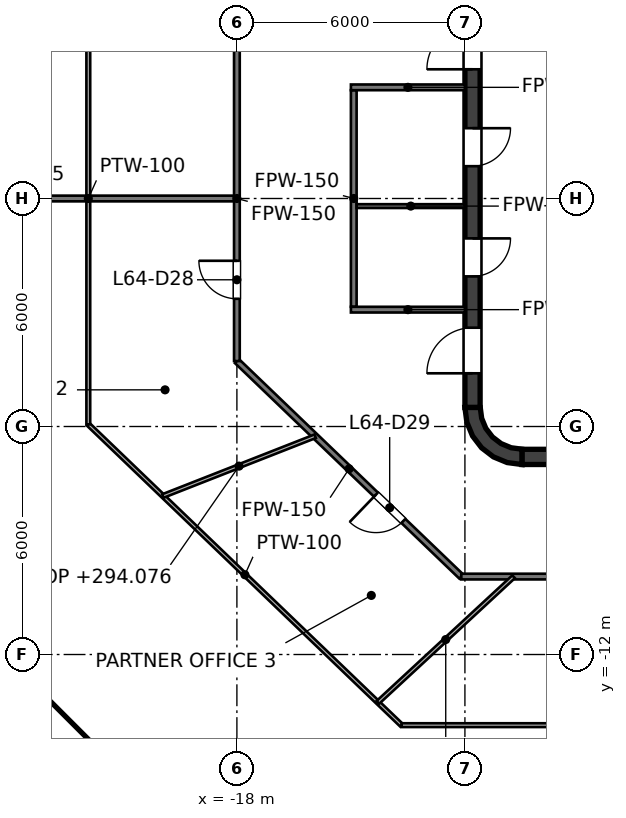
"""IFC4 building model, lengths in metres.
Left out: names, types, materials, properties, quantities, classifications, styles, units other than length and angle.
Written with IfcOpenShell. Run it as: python <this file> out.ifc"""

import sys

from ifc_helpers import new_model, si_unit, direction, frame, frame_2d, origin, place, context, subcontext, project, spatial, polyline, rectangle, outline, extrude, element, fill, save


model = new_model("IFC4")
c1 = context("Model", 3, precision=1e-05, world=origin(), true_north=direction((0.0, 1.0)))
c2 = subcontext(c1, "Body", "Model", "MODEL_VIEW")
j1 = project(units=[si_unit("LENGTHUNIT", "METRE"), si_unit("PLANEANGLEUNIT", "RADIAN")], contexts=[c1])
p1 = place(None, origin())
s1 = spatial("IfcSite", under=j1, at=p1, CompositionType="ELEMENT")
p2 = place(p1, origin())
s2 = spatial("IfcBuilding", under=s1, at=p2, CompositionType="ELEMENT")
p3 = place(p2, frame((0.0, 0.0, 291.0)))
s3 = spatial("IfcBuildingStorey", under=s2, at=p3, CompositionType="ELEMENT", Elevation=291.0)
p4 = place(p3, frame((-10.5, -6.8, 0.0), z_axis=(0.0, 0.0, 1.0), x_axis=(1.0, 0.0, 0.0)))
e1 = element("IfcWall", 1, at=p4, inside=s3, PredefinedType="SHEAR", context=c2, shape_type="SweptSolid", body=[
    extrude(rectangle(XDim=21.0, YDim=0.4, at=frame_2d((10.5, 0.0))), origin(), (0.0, 0.0, 1.0), 4.0),
])
p5 = place(p3, frame((-11.8, -5.5, 0.0), z_axis=(0.0, 0.0, 1.0), x_axis=(0.0, 1.0, 0.0)))
e2 = element("IfcWall", 2, at=p5, inside=s3, PredefinedType="SHEAR", context=c2, shape_type="SweptSolid", body=[
    extrude(rectangle(XDim=11.0, YDim=0.4, at=frame_2d((5.5, 0.0))), origin(), (0.0, 0.0, 1.0), 4.0),
])
p6 = place(p5, frame((3.45, 0.0, 0.0)))
e3 = element("IfcOpeningElement", 3, at=p6, cuts=e2, PredefinedType="OPENING", context=c2, shape_type="SweptSolid", body=[
    extrude(rectangle(XDim=1.0, YDim=2.1, at=frame_2d((0.5, 1.05))), frame((0.0, 0.2, 0.0), z_axis=(0.0, -1.0, 0.0), x_axis=(1.0, 0.0, 0.0)), (0.0, 0.0, 1.0), 0.4),
])
p7 = place(p5, frame((6.35, 0.0, 0.0)))
e4 = element("IfcOpeningElement", 4, at=p7, cuts=e2, PredefinedType="OPENING", context=c2, shape_type="SweptSolid", body=[
    extrude(rectangle(XDim=1.0, YDim=2.1, at=frame_2d((0.5, 1.05))), frame((0.0, 0.2, 0.0), z_axis=(0.0, -1.0, 0.0), x_axis=(1.0, 0.0, 0.0)), (0.0, 0.0, 1.0), 0.4),
])
p8 = place(p5, frame((0.9, 0.0, 0.0)))
e5 = element("IfcOpeningElement", 5, at=p8, cuts=e2, PredefinedType="OPENING", context=c2, shape_type="SweptSolid", body=[
    extrude(rectangle(XDim=1.2, YDim=2.1, at=frame_2d((0.6, 1.05))), frame((0.0, 0.2, 0.0), z_axis=(0.0, -1.0, 0.0), x_axis=(1.0, 0.0, 0.0)), (0.0, 0.0, 1.0), 0.4),
])
p9 = place(p5, frame((8.9, 0.0, 0.0)))
e6 = element("IfcOpeningElement", 6, at=p9, cuts=e2, PredefinedType="OPENING", context=c2, shape_type="SweptSolid", body=[
    extrude(rectangle(XDim=1.2, YDim=2.1, at=frame_2d((0.6, 1.05))), frame((0.0, 0.2, 0.0), z_axis=(0.0, -1.0, 0.0), x_axis=(1.0, 0.0, 0.0)), (0.0, 0.0, 1.0), 0.4),
])
p10 = place(p3, origin())
e7 = element("IfcWall", 7, at=p10, inside=s3, PredefinedType="SHEAR", context=c2, shape_type="SweptSolid", body=[
    extrude(outline(polyline([(-10.5, -7.0), (-10.5, -6.596), (-10.784, -6.559), (-11.048, -6.45), (-11.275, -6.275), (-11.45, -6.048), (-11.559, -5.784), (-11.596, -5.5), (-12.0, -5.5), (-11.949, -5.888), (-11.799, -6.25), (-11.561, -6.561), (-11.25, -6.799), (-10.888, -6.949), (-10.5, -7.0)])), origin(), (0.0, 0.0, 1.0), 4.0),
])
p11 = place(p3, frame((-14.925, -2.85, 0.0), z_axis=(0.0, 0.0, 1.0), x_axis=(0.0, 1.0, 0.0)))
e8 = element("IfcWall", 8, at=p11, inside=s3, PredefinedType="PARTITIONING", context=c2, shape_type="SweptSolid", body=[
    extrude(rectangle(XDim=5.7, YDim=0.15, at=frame_2d((2.85, 0.0))), origin(), (0.0, 0.0, 1.0), 2.927),
])
for number, where, z_axis, x_axis in (
    (9, (-15.0, 2.925, 0.0), (0.0, 0.0, 1.0), (1.0, 0.0, 0.0)),
    (10, (-15.0, -2.925, 0.0), (0.0, 0.0, 1.0), (1.0, 0.0, 0.0)),
):
    element("IfcWall", number, at=place(p3, frame(where, z_axis=z_axis, x_axis=x_axis)), inside=s3, PredefinedType="PARTITIONING", context=c2, shape_type="SweptSolid", body=[
        extrude(rectangle(XDim=3.0, YDim=0.15, at=frame_2d((1.5, 0.0))), origin(), (0.0, 0.0, 1.0), 3.85),
    ])
p12 = place(p3, frame((-14.85, -0.2, 0.0), z_axis=(0.0, 0.0, 1.0), x_axis=(1.0, 0.0, 0.0)))
e11 = element("IfcWall", 11, at=p12, inside=s3, PredefinedType="PARTITIONING", context=c2, shape_type="SweptSolid", body=[
    extrude(rectangle(XDim=2.85, YDim=0.1, at=frame_2d((1.425, 0.0))), origin(), (0.0, 0.0, 1.0), 3.85),
])
p13 = place(p3, frame((-18.0, -4.278, 0.0), z_axis=(0.0, 0.0, 1.0), x_axis=(0.721290181137, -0.692633001376, 0.0)))
e12 = element("IfcWall", 12, at=p13, inside=s3, PredefinedType="PARTITIONING", context=c2, shape_type="SweptSolid", body=[
    extrude(rectangle(XDim=8.187, YDim=0.15, at=frame_2d((4.094, 0.0))), origin(), (0.0, 0.0, 1.0), 2.927),
])
p14 = place(p13, frame((5.074, 0.0, 0.0)))
e13 = element("IfcOpeningElement", 13, at=p14, cuts=e12, PredefinedType="OPENING", context=c2, shape_type="SweptSolid", body=[
    extrude(rectangle(XDim=1.0, YDim=2.1, at=frame_2d((0.5, 1.05))), frame((0.0, 0.075, 0.0), z_axis=(0.0, -1.0, 0.0), x_axis=(1.0, 0.0, 0.0)), (0.0, 0.0, 1.0), 0.15),
])
p15 = place(p3, frame((-12.095, -9.949, 0.0), z_axis=(0.0, 0.0, 1.0), x_axis=(1.0, 0.0, 0.0)))
e14 = element("IfcWall", 14, at=p15, inside=s3, PredefinedType="PARTITIONING", context=c2, shape_type="SweptSolid", body=[
    extrude(rectangle(XDim=24.19, YDim=0.15, at=frame_2d((12.095, 0.0))), origin(), (0.0, 0.0, 1.0), 2.927),
])
p16 = place(p15, frame((22.617, 0.0, 0.0)))
e15 = element("IfcOpeningElement", 15, at=p16, cuts=e14, PredefinedType="OPENING", context=c2, shape_type="SweptSolid", body=[
    extrude(rectangle(XDim=1.0, YDim=2.1, at=frame_2d((0.5, 1.05))), frame((0.0, 0.075, 0.0), z_axis=(0.0, -1.0, 0.0), x_axis=(1.0, 0.0, 0.0)), (0.0, 0.0, 1.0), 0.15),
])
p17 = place(p15, frame((4.9, 0.0, 0.0)))
e16 = element("IfcOpeningElement", 16, at=p17, cuts=e14, PredefinedType="OPENING", context=c2, shape_type="SweptSolid", body=[
    extrude(rectangle(XDim=1.0, YDim=2.1, at=frame_2d((0.5, 1.05))), frame((0.0, 0.075, 0.0), z_axis=(0.0, -1.0, 0.0), x_axis=(1.0, 0.0, 0.0)), (0.0, 0.0, 1.0), 0.15),
])
p18 = place(p15, frame((11.05, 0.0, 0.0)))
e17 = element("IfcOpeningElement", 17, at=p18, cuts=e14, PredefinedType="OPENING", context=c2, shape_type="SweptSolid", body=[
    extrude(rectangle(XDim=1.0, YDim=2.1, at=frame_2d((0.5, 1.05))), frame((0.0, 0.075, 0.0), z_axis=(0.0, -1.0, 0.0), x_axis=(1.0, 0.0, 0.0)), (0.0, 0.0, 1.0), 0.15),
])
p19 = place(p15, frame((17.307, 0.0, 0.0)))
e18 = element("IfcOpeningElement", 18, at=p19, cuts=e14, PredefinedType="OPENING", context=c2, shape_type="SweptSolid", body=[
    extrude(rectangle(XDim=1.0, YDim=2.1, at=frame_2d((0.5, 1.05))), frame((0.0, 0.075, 0.0), z_axis=(0.0, -1.0, 0.0), x_axis=(1.0, 0.0, 0.0)), (0.0, 0.0, 1.0), 0.15),
])
p20 = place(p3, frame((-28.18, 0.0, 0.0), z_axis=(0.0, 0.0, 1.0), x_axis=(1.0, 0.0, 0.0)))
e19 = element("IfcWall", 19, at=p20, inside=s3, PredefinedType="PARTITIONING", context=c2, shape_type="SweptSolid", body=[
    extrude(rectangle(XDim=10.18, YDim=0.15, at=frame_2d((5.09, 0.0))), origin(), (0.0, 0.0, 1.0), 2.995),
])
p21 = place(p3, frame((-18.0, -4.278, 0.0), z_axis=(0.0, 0.0, 1.0), x_axis=(0.0, 1.0, 0.0)))
e20 = element("IfcWall", 20, at=p21, inside=s3, PredefinedType="PARTITIONING", context=c2, shape_type="SweptSolid", body=[
    extrude(rectangle(XDim=8.556, YDim=0.15, at=frame_2d((4.278, 0.0))), origin(), (0.0, 0.0, 1.0), 2.927),
])
p22 = place(p21, frame((1.639, 0.0, 0.0)))
e21 = element("IfcOpeningElement", 21, at=p22, cuts=e20, PredefinedType="OPENING", context=c2, shape_type="SweptSolid", body=[
    extrude(rectangle(XDim=1.0, YDim=2.1, at=frame_2d((0.5, 1.05))), frame((0.0, 0.075, 0.0), z_axis=(0.0, -1.0, 0.0), x_axis=(1.0, 0.0, 0.0)), (0.0, 0.0, 1.0), 0.15),
])
p23 = place(p3, frame((-21.91, -5.944, 0.0), z_axis=(0.0, 0.0, 1.0), x_axis=(0.721193028331, -0.692734159608, 0.0)))
e22 = element("IfcWall", 22, at=p23, inside=s3, PredefinedType="PARTITIONING", context=c2, shape_type="SweptSolid", body=[
    extrude(rectangle(XDim=11.427, YDim=0.1, at=frame_2d((5.713, 0.0))), origin(), (0.0, 0.0, 1.0), 2.927),
])
p24 = place(p3, frame((-13.668, -13.859, 0.0), z_axis=(0.0, 0.0, 1.0), x_axis=(1.0, 0.0, 0.0)))
e23 = element("IfcWall", 23, at=p24, inside=s3, PredefinedType="PARTITIONING", context=c2, shape_type="SweptSolid", body=[
    extrude(rectangle(XDim=27.337, YDim=0.1, at=frame_2d((13.668, 0.0))), origin(), (0.0, 0.0, 1.0), 2.927),
])
p25 = place(p24, frame((4.127, 0.0, 0.0)))
e24 = element("IfcOpeningElement", 24, at=p25, cuts=e23, PredefinedType="OPENING", context=c2, shape_type="SweptSolid", body=[
    extrude(rectangle(XDim=1.8, YDim=2.1, at=frame_2d((0.9, 1.05))), frame((0.0, 0.05, 0.0), z_axis=(0.0, -1.0, 0.0), x_axis=(1.0, 0.0, 0.0)), (0.0, 0.0, 1.0), 0.1),
])
p26 = place(p24, frame((20.7, 0.0, 0.0)))
e25 = element("IfcOpeningElement", 25, at=p26, cuts=e23, PredefinedType="OPENING", context=c2, shape_type="SweptSolid", body=[
    extrude(rectangle(XDim=1.8, YDim=2.1, at=frame_2d((0.9, 1.05))), frame((0.0, 0.05, 0.0), z_axis=(0.0, -1.0, 0.0), x_axis=(1.0, 0.0, 0.0)), (0.0, 0.0, 1.0), 0.1),
])
p27 = place(p3, frame((-19.947, -7.829, 0.0), z_axis=(0.0, 0.0, 1.0), x_axis=(0.930847279984, 0.36540845823, 0.0)))
e26 = element("IfcWall", 26, at=p27, inside=s3, PredefinedType="PARTITIONING", context=c2, shape_type="SweptSolid", body=[
    extrude(rectangle(XDim=4.305, YDim=0.1, at=frame_2d((2.152, 0.0))), origin(), (0.0, 0.0, 1.0), 3.076),
])
p28 = place(p3, frame((-14.291, -13.26, 0.0), z_axis=(0.0, 0.0, 1.0), x_axis=(0.733889385895, 0.679268996253, 0.0)))
e27 = element("IfcWall", 27, at=p28, inside=s3, PredefinedType="PARTITIONING", context=c2, shape_type="SweptSolid", body=[
    extrude(rectangle(XDim=4.868, YDim=0.1, at=frame_2d((2.434, 0.0))), origin(), (0.0, 0.0, 1.0), 3.85),
])
p29 = place(p3, frame((-21.91, -5.944, 0.0), z_axis=(0.0, 0.0, 1.0), x_axis=(0.0, 1.0, 0.0)))
e28 = element("IfcWall", 28, at=p29, inside=s3, PredefinedType="PARTITIONING", context=c2, shape_type="SweptSolid", body=[
    extrude(rectangle(XDim=11.888, YDim=0.1, at=frame_2d((5.944, 0.0))), origin(), (0.0, 0.0, 1.0), 2.927),
])
p30 = place(p6, origin())
e29 = element("IfcDoor", 29, at=p30, inside=s3, OperationType="SINGLE_SWING_RIGHT", PredefinedType="DOOR", context=c2, shape_type="SweptSolid", body=[
    extrude(rectangle(XDim=1.0, YDim=2.1, at=frame_2d((0.5, 1.05))), frame((0.0, 0.025, 0.0), z_axis=(0.0, -1.0, 0.0), x_axis=(1.0, 0.0, 0.0)), (0.0, 0.0, 1.0), 0.05),
])
fill(e3, e29)
p31 = place(p7, origin())
e30 = element("IfcDoor", 30, at=p31, inside=s3, OperationType="SINGLE_SWING_RIGHT", PredefinedType="DOOR", context=c2, shape_type="SweptSolid", body=[
    extrude(rectangle(XDim=1.0, YDim=2.1, at=frame_2d((0.5, 1.05))), frame((0.0, 0.025, 0.0), z_axis=(0.0, -1.0, 0.0), x_axis=(1.0, 0.0, 0.0)), (0.0, 0.0, 1.0), 0.05),
])
fill(e4, e30)
p32 = place(p8, origin())
e31 = element("IfcDoor", 31, at=p32, inside=s3, OperationType="SINGLE_SWING_LEFT", PredefinedType="DOOR", context=c2, shape_type="SweptSolid", body=[
    extrude(rectangle(XDim=1.2, YDim=2.1, at=frame_2d((0.6, 1.05))), frame((0.0, 0.025, 0.0), z_axis=(0.0, -1.0, 0.0), x_axis=(1.0, 0.0, 0.0)), (0.0, 0.0, 1.0), 0.05),
])
fill(e5, e31)
p33 = place(p9, origin())
e32 = element("IfcDoor", 32, at=p33, inside=s3, OperationType="SINGLE_SWING_LEFT", PredefinedType="DOOR", context=c2, shape_type="SweptSolid", body=[
    extrude(rectangle(XDim=1.2, YDim=2.1, at=frame_2d((0.6, 1.05))), frame((0.0, 0.025, 0.0), z_axis=(0.0, -1.0, 0.0), x_axis=(1.0, 0.0, 0.0)), (0.0, 0.0, 1.0), 0.05),
])
fill(e6, e32)
p34 = place(p22, origin())
e33 = element("IfcDoor", 33, at=p34, inside=s3, OperationType="SINGLE_SWING_RIGHT", PredefinedType="DOOR", context=c2, shape_type="SweptSolid", body=[
    extrude(rectangle(XDim=1.0, YDim=2.1, at=frame_2d((0.5, 1.05))), frame((0.0, 0.025, 0.0), z_axis=(0.0, -1.0, 0.0), x_axis=(1.0, 0.0, 0.0)), (0.0, 0.0, 1.0), 0.05),
])
fill(e21, e33)
p35 = place(p14, origin())
e34 = element("IfcDoor", 34, at=p35, inside=s3, OperationType="SINGLE_SWING_LEFT", PredefinedType="DOOR", context=c2, shape_type="SweptSolid", body=[
    extrude(rectangle(XDim=1.0, YDim=2.1, at=frame_2d((0.5, 1.05))), frame((0.0, 0.025, 0.0), z_axis=(0.0, -1.0, 0.0), x_axis=(1.0, 0.0, 0.0)), (0.0, 0.0, 1.0), 0.05),
])
fill(e13, e34)
save(model, sys.argv[1])
